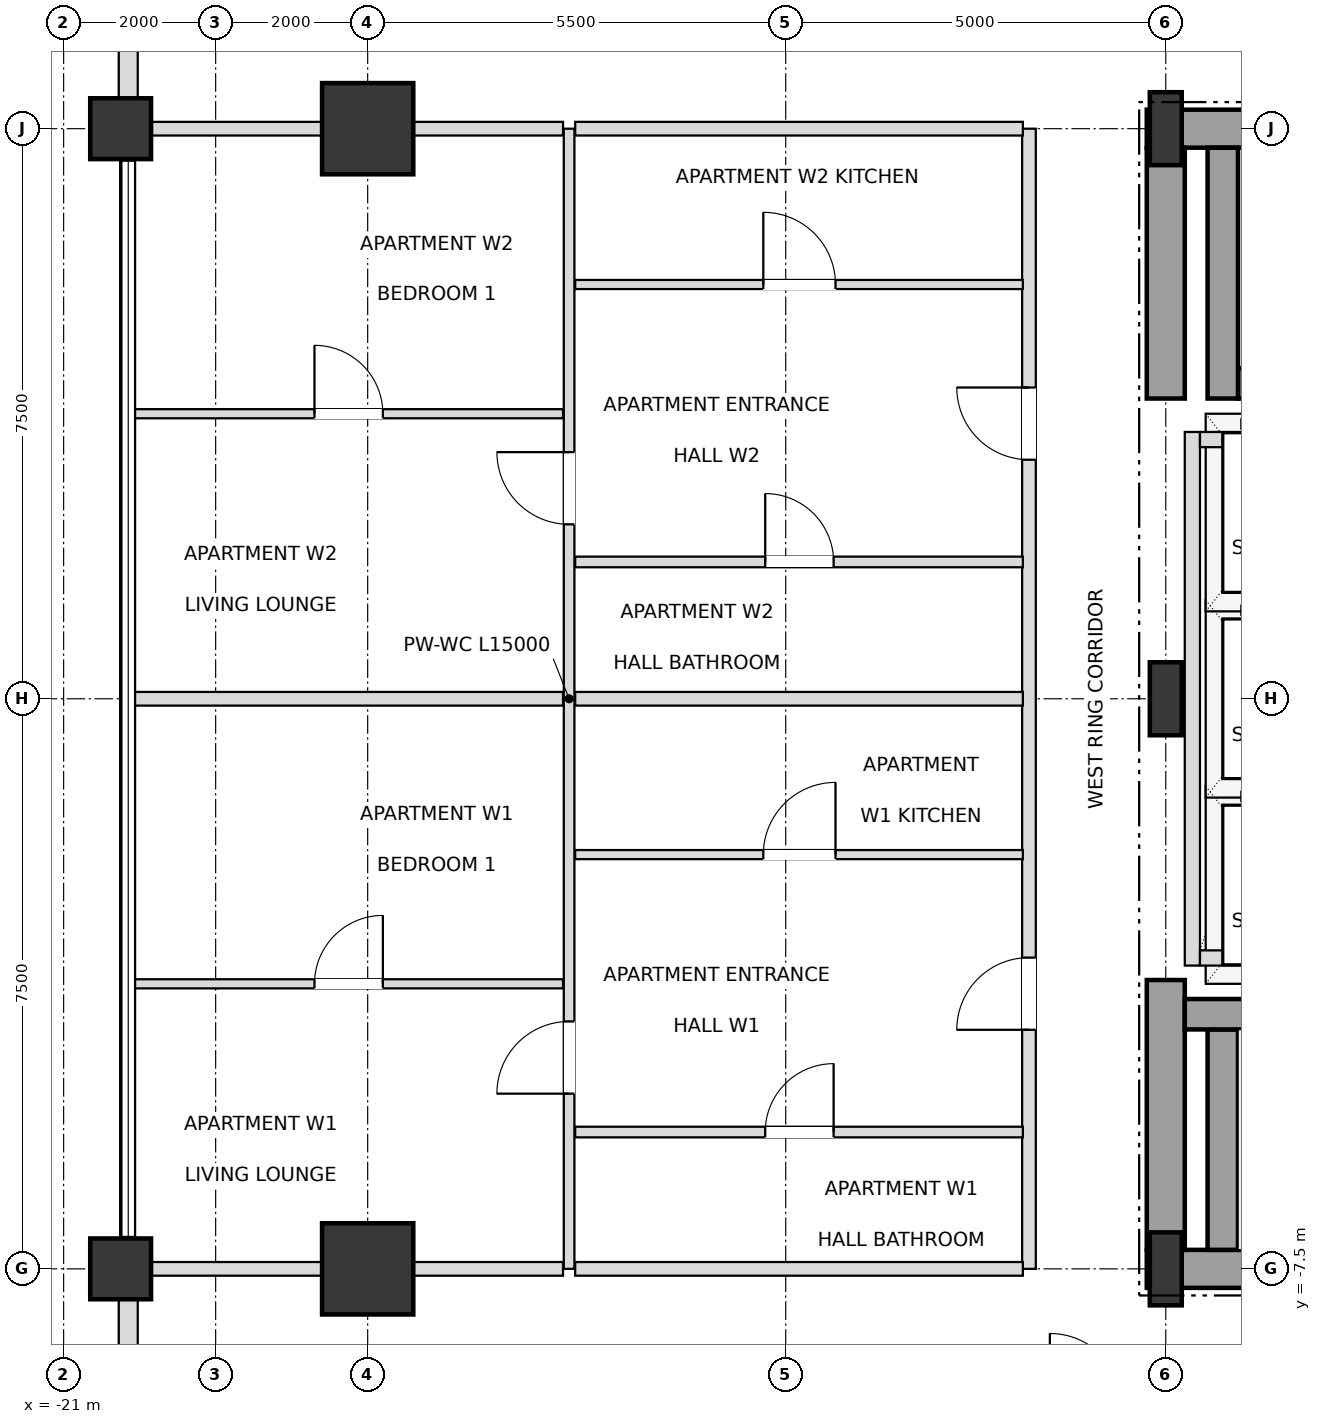
"""IFC4 building model, lengths in metres.
Left out: names, types, materials, properties, quantities, classifications, styles, units other than length and angle.
Written with IfcOpenShell. Run it as: python <this file> out.ifc"""

import sys

from ifc_helpers import new_model, si_unit, direction, frame, frame_2d, origin, origin_2d, place, context, subcontext, project, spatial, rectangle, i_section, extrude, element, fill, save


model = new_model("IFC4")
c1 = context("Model", 3, precision=1e-05, world=origin(), true_north=direction((0.0, 1.0)))
c2 = subcontext(c1, "Body", "Model", "MODEL_VIEW")
j1 = project(units=[si_unit("LENGTHUNIT", "METRE"), si_unit("PLANEANGLEUNIT", "RADIAN")], contexts=[c1])
p1 = place(None, origin())
s1 = spatial("IfcSite", under=j1, at=p1, CompositionType="ELEMENT")
p2 = place(p1, origin())
s2 = spatial("IfcBuilding", under=s1, at=p2, CompositionType="ELEMENT")
p3 = place(p2, frame((0.0, 0.0, 102.6)))
s3 = spatial("IfcBuildingStorey", under=s2, at=p3, CompositionType="ELEMENT", Elevation=102.6)
for number, where, z_axis, x_axis in (
    (1, (-6.5, -7.5, 0.0), (0.0, 0.0, 1.0), (1.0, 0.0, 0.0)),
    (2, (-6.5, 0.0, 0.0), (0.0, 0.0, 1.0), (1.0, 0.0, 0.0)),
    (3, (-6.5, 7.5, 0.0), (0.0, 0.0, 1.0), (1.0, 0.0, 0.0)),
):
    element("IfcColumn", number, at=place(p3, frame(where, z_axis=z_axis, x_axis=x_axis)), inside=s3, PredefinedType="COLUMN", context=c2, shape_type="SweptSolid", body=[
        extrude(i_section(OverallWidth=0.42, OverallDepth=0.96, WebThickness=0.022, FlangeThickness=0.034, at=origin_2d()), origin(), (0.0, 0.0, 1.0), 3.6),
    ])
for number, where, z_axis, x_axis in (
    (4, (-17.0, 7.5, 0.0), (0.0, 0.0, 1.0), (1.0, 0.0, 0.0)),
    (5, (-17.0, -7.5, 0.0), (0.0, 0.0, 1.0), (1.0, 0.0, 0.0)),
):
    element("IfcColumn", number, at=place(p3, frame(where, z_axis=z_axis, x_axis=x_axis)), inside=s3, PredefinedType="USERDEFINED", context=c2, shape_type="SweptSolid", body=[
        extrude(rectangle(XDim=1.2, YDim=1.2, at=origin_2d()), origin(), (0.0, 0.0, 1.0), 3.6),
    ])
for number, where, z_axis, x_axis in (
    (6, (-20.25, -7.5, 0.0), (0.0, 0.0, 1.0), (1.0, 0.0, 0.0)),
    (7, (-20.25, 7.5, 0.0), (0.0, 0.0, 1.0), (1.0, 0.0, 0.0)),
):
    element("IfcColumn", number, at=place(p3, frame(where, z_axis=z_axis, x_axis=x_axis)), inside=s3, PredefinedType="COLUMN", context=c2, shape_type="SweptSolid", body=[
        extrude(rectangle(XDim=0.8, YDim=0.8, at=origin_2d()), origin(), (0.0, 0.0, 1.0), 3.6),
    ])
p4 = place(p3, frame((-20.15, 12.605, 0.0), z_axis=(0.0, 0.0, 1.0), x_axis=(0.0, -1.0, 0.0)))
e8 = element("IfcWall", 8, at=p4, inside=s3, PredefinedType="SOLIDWALL", context=c2, shape_type="SweptSolid", body=[
    extrude(rectangle(XDim=4.71, YDim=0.25, at=frame_2d((2.355, 0.0))), origin(), (0.0, 0.0, 1.0), 2.736),
])
p5 = place(p4, frame((1.455, 0.0, 0.72)))
e9 = element("IfcOpeningElement", 9, at=p5, cuts=e8, PredefinedType="OPENING", context=c2, shape_type="SweptSolid", body=[
    extrude(rectangle(XDim=1.8, YDim=1.68, at=frame_2d((0.9, 0.84))), frame((0.0, 0.135, 0.0), z_axis=(0.0, -1.0, 0.0), x_axis=(1.0, 0.0, 0.0)), (0.0, 0.0, 1.0), 0.27),
])
p6 = place(p3, frame((-20.15, -7.895, 0.0), z_axis=(0.0, 0.0, 1.0), x_axis=(0.0, -1.0, 0.0)))
e10 = element("IfcWall", 10, at=p6, inside=s3, PredefinedType="SOLIDWALL", context=c2, shape_type="SweptSolid", body=[
    extrude(rectangle(XDim=4.71, YDim=0.25, at=frame_2d((2.355, 0.0))), origin(), (0.0, 0.0, 1.0), 2.736),
])
p7 = place(p6, frame((1.455, 0.0, 0.72)))
e11 = element("IfcOpeningElement", 11, at=p7, cuts=e10, PredefinedType="OPENING", context=c2, shape_type="SweptSolid", body=[
    extrude(rectangle(XDim=1.8, YDim=1.68, at=frame_2d((0.9, 0.84))), frame((0.0, 0.135, 0.0), z_axis=(0.0, -1.0, 0.0), x_axis=(1.0, 0.0, 0.0)), (0.0, 0.0, 1.0), 0.27),
])
p8 = place(p3, frame((-6.75, -7.5, 0.0), z_axis=(0.0, 0.0, 1.0), x_axis=(1.0, 0.0, 0.0)))
e12 = element("IfcWall", 12, at=p8, inside=s3, PredefinedType="SHEAR", context=c2, shape_type="SweptSolid", body=[
    extrude(rectangle(XDim=6.75, YDim=0.5, at=frame_2d((3.375, 0.0))), origin(), (0.0, 0.0, 1.0), 3.38),
])
p9 = place(p3, frame((-6.75, 7.5, 0.0), z_axis=(0.0, 0.0, 1.0), x_axis=(1.0, 0.0, 0.0)))
e13 = element("IfcWall", 13, at=p9, inside=s3, PredefinedType="SHEAR", context=c2, shape_type="SweptSolid", body=[
    extrude(rectangle(XDim=6.75, YDim=0.5, at=frame_2d((3.375, 0.0))), origin(), (0.0, 0.0, 1.0), 3.38),
])
p10 = place(p9, frame((1.65, 0.0, 0.0)))
e14 = element("IfcOpeningElement", 14, at=p10, cuts=e13, PredefinedType="OPENING", context=c2, shape_type="SweptSolid", body=[
    extrude(rectangle(XDim=1.05, YDim=2.15, at=frame_2d((0.525, 1.075))), frame((0.0, 0.26, 0.0), z_axis=(0.0, -1.0, 0.0), x_axis=(1.0, 0.0, 0.0)), (0.0, 0.0, 1.0), 0.52),
])
p11 = place(p3, frame((-6.5, -7.25, 0.0), z_axis=(0.0, 0.0, 1.0), x_axis=(0.0, 1.0, 0.0)))
e15 = element("IfcWall", 15, at=p11, inside=s3, PredefinedType="SHEAR", context=c2, shape_type="SweptSolid", body=[
    extrude(rectangle(XDim=3.55, YDim=0.5, at=frame_2d((1.775, 0.0))), origin(), (0.0, 0.0, 1.0), 3.38),
])
p12 = place(p3, frame((-6.5, 3.95, 0.0), z_axis=(0.0, 0.0, 1.0), x_axis=(0.0, 1.0, 0.0)))
e16 = element("IfcWall", 16, at=p12, inside=s3, PredefinedType="SHEAR", context=c2, shape_type="SweptSolid", body=[
    extrude(rectangle(XDim=3.3, YDim=0.5, at=frame_2d((1.65, 0.0))), origin(), (0.0, 0.0, 1.0), 3.38),
])
p13 = place(p3, frame((-5.75, -7.25, 0.0), z_axis=(0.0, 0.0, 1.0), x_axis=(0.0, 1.0, 0.0)))
e17 = element("IfcWall", 17, at=p13, inside=s3, PredefinedType="SHEAR", context=c2, shape_type="SweptSolid", body=[
    extrude(rectangle(XDim=2.9, YDim=0.4, at=frame_2d((1.45, 0.0))), origin(), (0.0, 0.0, 1.0), 3.38),
])
p14 = place(p3, frame((-6.25, -4.15, 0.0), z_axis=(0.0, 0.0, 1.0), x_axis=(1.0, 0.0, 0.0)))
e18 = element("IfcWall", 18, at=p14, inside=s3, PredefinedType="SHEAR", context=c2, shape_type="SweptSolid", body=[
    extrude(rectangle(XDim=7.78, YDim=0.4, at=frame_2d((3.89, 0.0))), origin(), (0.0, 0.0, 1.0), 3.38),
])
p15 = place(p3, frame((-5.55, 4.15, 0.0), z_axis=(0.0, 0.0, 1.0), x_axis=(1.0, 0.0, 0.0)))
e19 = element("IfcWall", 19, at=p15, inside=s3, PredefinedType="SHEAR", context=c2, shape_type="SweptSolid", body=[
    extrude(rectangle(XDim=7.08, YDim=0.4, at=frame_2d((3.54, 0.0))), origin(), (0.0, 0.0, 1.0), 3.38),
])
p16 = place(p3, frame((-5.75, 3.95, 0.0), z_axis=(0.0, 0.0, 1.0), x_axis=(0.0, 1.0, 0.0)))
e20 = element("IfcWall", 20, at=p16, inside=s3, PredefinedType="SHEAR", context=c2, shape_type="SweptSolid", body=[
    extrude(rectangle(XDim=3.3, YDim=0.4, at=frame_2d((1.65, 0.0))), origin(), (0.0, 0.0, 1.0), 3.38),
])
p17 = place(p3, frame((-6.15, -3.51, 0.0), z_axis=(0.0, 0.0, 1.0), x_axis=(0.0, 1.0, 0.0)))
e21 = element("IfcWall", 21, at=p17, inside=s3, PredefinedType="SOLIDWALL", context=c2, shape_type="SweptSolid", body=[
    extrude(rectangle(XDim=7.02, YDim=0.2, at=frame_2d((3.51, 0.0))), origin(), (0.0, 0.0, 1.0), 3.38),
])
for number, where, z_axis, x_axis in (
    (22, (-6.05, -3.41, 0.0), (0.0, 0.0, 1.0), (1.0, 0.0, 0.0)),
    (23, (-6.05, 3.41, 0.0), (0.0, 0.0, 1.0), (1.0, 0.0, 0.0)),
):
    element("IfcWall", number, at=place(p3, frame(where, z_axis=z_axis, x_axis=x_axis)), inside=s3, PredefinedType="SOLIDWALL", context=c2, shape_type="SweptSolid", body=[
        extrude(rectangle(XDim=2.2, YDim=0.2, at=frame_2d((1.1, 0.0))), origin(), (0.0, 0.0, 1.0), 3.38),
    ])
p18 = place(p3, frame((-14.35, -7.5, 0.0), z_axis=(0.0, 0.0, 1.0), x_axis=(0.0, 1.0, 0.0)))
e24 = element("IfcWall", 24, at=p18, inside=s3, PredefinedType="PARTITIONING", context=c2, shape_type="SweptSolid", body=[
    extrude(rectangle(XDim=15.0, YDim=0.14, at=frame_2d((7.5, 0.0))), origin(), (0.0, 0.0, 1.0), 3.38),
])
p19 = place(p18, frame((2.305, 0.0, 0.0)))
e25 = element("IfcOpeningElement", 25, at=p19, cuts=e24, PredefinedType="OPENING", context=c2, shape_type="SweptSolid", body=[
    extrude(rectangle(XDim=0.95, YDim=2.1, at=frame_2d((0.475, 1.05))), frame((0.0, 0.08, 0.0), z_axis=(0.0, -1.0, 0.0), x_axis=(1.0, 0.0, 0.0)), (0.0, 0.0, 1.0), 0.16),
])
p20 = place(p18, frame((9.795, 0.0, 0.0)))
e26 = element("IfcOpeningElement", 26, at=p20, cuts=e24, PredefinedType="OPENING", context=c2, shape_type="SweptSolid", body=[
    extrude(rectangle(XDim=0.95, YDim=2.1, at=frame_2d((0.475, 1.05))), frame((0.0, 0.08, 0.0), z_axis=(0.0, -1.0, 0.0), x_axis=(1.0, 0.0, 0.0)), (0.0, 0.0, 1.0), 0.16),
])
p21 = place(p3, frame((-8.3, -7.5, 0.0), z_axis=(0.0, 0.0, 1.0), x_axis=(0.0, 1.0, 0.0)))
e27 = element("IfcWall", 27, at=p21, inside=s3, PredefinedType="PARTITIONING", context=c2, shape_type="SweptSolid", body=[
    extrude(rectangle(XDim=15.0, YDim=0.18, at=frame_2d((7.5, 0.0))), origin(), (0.0, 0.0, 1.0), 3.38),
])
p22 = place(p21, frame((3.145, 0.0, 0.0)))
e28 = element("IfcOpeningElement", 28, at=p22, cuts=e27, PredefinedType="OPENING", context=c2, shape_type="SweptSolid", body=[
    extrude(rectangle(XDim=0.95, YDim=2.15, at=frame_2d((0.475, 1.075))), frame((0.0, 0.1, 0.0), z_axis=(0.0, -1.0, 0.0), x_axis=(1.0, 0.0, 0.0)), (0.0, 0.0, 1.0), 0.2),
])
p23 = place(p21, frame((10.645, 0.0, 0.0)))
e29 = element("IfcOpeningElement", 29, at=p23, cuts=e27, PredefinedType="OPENING", context=c2, shape_type="SweptSolid", body=[
    extrude(rectangle(XDim=0.95, YDim=2.15, at=frame_2d((0.475, 1.075))), frame((0.0, 0.1, 0.0), z_axis=(0.0, -1.0, 0.0), x_axis=(1.0, 0.0, 0.0)), (0.0, 0.0, 1.0), 0.2),
])
p24 = place(p3, frame((-20.15, -7.5, 0.0), z_axis=(0.0, 0.0, 1.0), x_axis=(1.0, 0.0, 0.0)))
e30 = element("IfcWall", 30, at=p24, inside=s3, PredefinedType="PARTITIONING", context=c2, shape_type="SweptSolid", body=[
    extrude(rectangle(XDim=5.72, YDim=0.18, at=frame_2d((2.86, 0.0))), origin(), (0.0, 0.0, 1.0), 2.816),
])
p25 = place(p3, frame((-14.27, -7.5, 0.0), z_axis=(0.0, 0.0, 1.0), x_axis=(1.0, 0.0, 0.0)))
e31 = element("IfcWall", 31, at=p25, inside=s3, PredefinedType="PARTITIONING", context=c2, shape_type="SweptSolid", body=[
    extrude(rectangle(XDim=5.89, YDim=0.18, at=frame_2d((2.945, 0.0))), origin(), (0.0, 0.0, 1.0), 2.816),
])
p26 = place(p3, frame((-14.27, -5.7, 0.0), z_axis=(0.0, 0.0, 1.0), x_axis=(1.0, 0.0, 0.0)))
e32 = element("IfcWall", 32, at=p26, inside=s3, PredefinedType="PARTITIONING", context=c2, shape_type="SweptSolid", body=[
    extrude(rectangle(XDim=5.89, YDim=0.14, at=frame_2d((2.945, 0.0))), origin(), (0.0, 0.0, 1.0), 3.38),
])
p27 = place(p26, frame((2.5, 0.0, 0.0)))
e33 = element("IfcOpeningElement", 33, at=p27, cuts=e32, PredefinedType="OPENING", context=c2, shape_type="SweptSolid", body=[
    extrude(rectangle(XDim=0.9, YDim=2.1, at=frame_2d((0.45, 1.05))), frame((0.0, 0.08, 0.0), z_axis=(0.0, -1.0, 0.0), x_axis=(1.0, 0.0, 0.0)), (0.0, 0.0, 1.0), 0.16),
])
p28 = place(p3, frame((-20.07, -3.75, 0.0), z_axis=(0.0, 0.0, 1.0), x_axis=(1.0, 0.0, 0.0)))
e34 = element("IfcWall", 34, at=p28, inside=s3, PredefinedType="PARTITIONING", context=c2, shape_type="SweptSolid", body=[
    extrude(rectangle(XDim=5.64, YDim=0.12, at=frame_2d((2.82, 0.0))), origin(), (0.0, 0.0, 1.0), 2.816),
])
p29 = place(p28, frame((2.37, 0.0, 0.0)))
e35 = element("IfcOpeningElement", 35, at=p29, cuts=e34, PredefinedType="OPENING", context=c2, shape_type="SweptSolid", body=[
    extrude(rectangle(XDim=0.9, YDim=2.1, at=frame_2d((0.45, 1.05))), frame((0.0, 0.07, 0.0), z_axis=(0.0, -1.0, 0.0), x_axis=(1.0, 0.0, 0.0)), (0.0, 0.0, 1.0), 0.14),
])
p30 = place(p3, frame((-14.27, -2.05, 0.0), z_axis=(0.0, 0.0, 1.0), x_axis=(1.0, 0.0, 0.0)))
e36 = element("IfcWall", 36, at=p30, inside=s3, PredefinedType="PARTITIONING", context=c2, shape_type="SweptSolid", body=[
    extrude(rectangle(XDim=5.89, YDim=0.12, at=frame_2d((2.945, 0.0))), origin(), (0.0, 0.0, 1.0), 3.38),
])
p31 = place(p30, frame((2.475, 0.0, 0.0)))
e37 = element("IfcOpeningElement", 37, at=p31, cuts=e36, PredefinedType="OPENING", context=c2, shape_type="SweptSolid", body=[
    extrude(rectangle(XDim=0.95, YDim=2.1, at=frame_2d((0.475, 1.05))), frame((0.0, 0.07, 0.0), z_axis=(0.0, -1.0, 0.0), x_axis=(1.0, 0.0, 0.0)), (0.0, 0.0, 1.0), 0.14),
])
p32 = place(p3, frame((-20.07, 0.0, 0.0), z_axis=(0.0, 0.0, 1.0), x_axis=(1.0, 0.0, 0.0)))
e38 = element("IfcWall", 38, at=p32, inside=s3, PredefinedType="PARTITIONING", context=c2, shape_type="SweptSolid", body=[
    extrude(rectangle(XDim=5.64, YDim=0.18, at=frame_2d((2.82, 0.0))), origin(), (0.0, 0.0, 1.0), 2.816),
])
p33 = place(p3, frame((-14.27, 0.0, 0.0), z_axis=(0.0, 0.0, 1.0), x_axis=(1.0, 0.0, 0.0)))
e39 = element("IfcWall", 39, at=p33, inside=s3, PredefinedType="PARTITIONING", context=c2, shape_type="SweptSolid", body=[
    extrude(rectangle(XDim=5.89, YDim=0.18, at=frame_2d((2.945, 0.0))), origin(), (0.0, 0.0, 1.0), 3.38),
])
p34 = place(p3, frame((-14.27, 1.8, 0.0), z_axis=(0.0, 0.0, 1.0), x_axis=(1.0, 0.0, 0.0)))
e40 = element("IfcWall", 40, at=p34, inside=s3, PredefinedType="PARTITIONING", context=c2, shape_type="SweptSolid", body=[
    extrude(rectangle(XDim=5.89, YDim=0.14, at=frame_2d((2.945, 0.0))), origin(), (0.0, 0.0, 1.0), 3.38),
])
p35 = place(p34, frame((2.5, 0.0, 0.0)))
e41 = element("IfcOpeningElement", 41, at=p35, cuts=e40, PredefinedType="OPENING", context=c2, shape_type="SweptSolid", body=[
    extrude(rectangle(XDim=0.9, YDim=2.1, at=frame_2d((0.45, 1.05))), frame((0.0, 0.08, 0.0), z_axis=(0.0, -1.0, 0.0), x_axis=(1.0, 0.0, 0.0)), (0.0, 0.0, 1.0), 0.16),
])
p36 = place(p3, frame((-20.07, 3.75, 0.0), z_axis=(0.0, 0.0, 1.0), x_axis=(1.0, 0.0, 0.0)))
e42 = element("IfcWall", 42, at=p36, inside=s3, PredefinedType="PARTITIONING", context=c2, shape_type="SweptSolid", body=[
    extrude(rectangle(XDim=5.64, YDim=0.12, at=frame_2d((2.82, 0.0))), origin(), (0.0, 0.0, 1.0), 2.816),
])
p37 = place(p36, frame((2.37, 0.0, 0.0)))
e43 = element("IfcOpeningElement", 43, at=p37, cuts=e42, PredefinedType="OPENING", context=c2, shape_type="SweptSolid", body=[
    extrude(rectangle(XDim=0.9, YDim=2.1, at=frame_2d((0.45, 1.05))), frame((0.0, 0.07, 0.0), z_axis=(0.0, -1.0, 0.0), x_axis=(1.0, 0.0, 0.0)), (0.0, 0.0, 1.0), 0.14),
])
p38 = place(p3, frame((-14.27, 5.45, 0.0), z_axis=(0.0, 0.0, 1.0), x_axis=(1.0, 0.0, 0.0)))
e44 = element("IfcWall", 44, at=p38, inside=s3, PredefinedType="PARTITIONING", context=c2, shape_type="SweptSolid", body=[
    extrude(rectangle(XDim=5.89, YDim=0.12, at=frame_2d((2.945, 0.0))), origin(), (0.0, 0.0, 1.0), 3.38),
])
p39 = place(p38, frame((2.475, 0.0, 0.0)))
e45 = element("IfcOpeningElement", 45, at=p39, cuts=e44, PredefinedType="OPENING", context=c2, shape_type="SweptSolid", body=[
    extrude(rectangle(XDim=0.95, YDim=2.1, at=frame_2d((0.475, 1.05))), frame((0.0, 0.07, 0.0), z_axis=(0.0, -1.0, 0.0), x_axis=(1.0, 0.0, 0.0)), (0.0, 0.0, 1.0), 0.14),
])
p40 = place(p3, frame((-20.15, 7.5, 0.0), z_axis=(0.0, 0.0, 1.0), x_axis=(1.0, 0.0, 0.0)))
e46 = element("IfcWall", 46, at=p40, inside=s3, PredefinedType="PARTITIONING", context=c2, shape_type="SweptSolid", body=[
    extrude(rectangle(XDim=5.72, YDim=0.18, at=frame_2d((2.86, 0.0))), origin(), (0.0, 0.0, 1.0), 2.816),
])
p41 = place(p3, frame((-14.27, 7.5, 0.0), z_axis=(0.0, 0.0, 1.0), x_axis=(1.0, 0.0, 0.0)))
e47 = element("IfcWall", 47, at=p41, inside=s3, PredefinedType="PARTITIONING", context=c2, shape_type="SweptSolid", body=[
    extrude(rectangle(XDim=5.89, YDim=0.18, at=frame_2d((2.945, 0.0))), origin(), (0.0, 0.0, 1.0), 2.816),
])
p42 = place(p27, origin())
e48 = element("IfcDoor", 48, at=p42, inside=s3, OperationType="SINGLE_SWING_RIGHT", PredefinedType="DOOR", context=c2, shape_type="SweptSolid", body=[
    extrude(rectangle(XDim=0.9, YDim=2.1, at=frame_2d((0.45, 1.05))), frame((0.0, 0.025, 0.0), z_axis=(0.0, -1.0, 0.0), x_axis=(1.0, 0.0, 0.0)), (0.0, 0.0, 1.0), 0.05),
])
fill(e33, e48)
p43 = place(p22, origin())
e49 = element("IfcDoor", 49, at=p43, inside=s3, OperationType="SINGLE_SWING_LEFT", PredefinedType="DOOR", context=c2, shape_type="SweptSolid", body=[
    extrude(rectangle(XDim=0.95, YDim=2.15, at=frame_2d((0.475, 1.075))), frame((0.0, 0.025, 0.0), z_axis=(0.0, -1.0, 0.0), x_axis=(1.0, 0.0, 0.0)), (0.0, 0.0, 1.0), 0.05),
])
fill(e28, e49)
p44 = place(p31, origin())
e50 = element("IfcDoor", 50, at=p44, inside=s3, OperationType="SINGLE_SWING_RIGHT", PredefinedType="DOOR", context=c2, shape_type="SweptSolid", body=[
    extrude(rectangle(XDim=0.95, YDim=2.1, at=frame_2d((0.475, 1.05))), frame((0.0, 0.025, 0.0), z_axis=(0.0, -1.0, 0.0), x_axis=(1.0, 0.0, 0.0)), (0.0, 0.0, 1.0), 0.05),
])
fill(e37, e50)
p45 = place(p19, origin())
e51 = element("IfcDoor", 51, at=p45, inside=s3, OperationType="SINGLE_SWING_LEFT", PredefinedType="DOOR", context=c2, shape_type="SweptSolid", body=[
    extrude(rectangle(XDim=0.95, YDim=2.1, at=frame_2d((0.475, 1.05))), frame((0.0, 0.025, 0.0), z_axis=(0.0, -1.0, 0.0), x_axis=(1.0, 0.0, 0.0)), (0.0, 0.0, 1.0), 0.05),
])
fill(e25, e51)
p46 = place(p29, origin())
e52 = element("IfcDoor", 52, at=p46, inside=s3, OperationType="SINGLE_SWING_RIGHT", PredefinedType="DOOR", context=c2, shape_type="SweptSolid", body=[
    extrude(rectangle(XDim=0.9, YDim=2.1, at=frame_2d((0.45, 1.05))), frame((0.0, 0.025, 0.0), z_axis=(0.0, -1.0, 0.0), x_axis=(1.0, 0.0, 0.0)), (0.0, 0.0, 1.0), 0.05),
])
fill(e35, e52)
p47 = place(p35, origin())
e53 = element("IfcDoor", 53, at=p47, inside=s3, OperationType="SINGLE_SWING_LEFT", PredefinedType="DOOR", context=c2, shape_type="SweptSolid", body=[
    extrude(rectangle(XDim=0.9, YDim=2.1, at=frame_2d((0.45, 1.05))), frame((0.0, 0.025, 0.0), z_axis=(0.0, -1.0, 0.0), x_axis=(1.0, 0.0, 0.0)), (0.0, 0.0, 1.0), 0.05),
])
fill(e41, e53)
p48 = place(p23, origin())
e54 = element("IfcDoor", 54, at=p48, inside=s3, OperationType="SINGLE_SWING_RIGHT", PredefinedType="DOOR", context=c2, shape_type="SweptSolid", body=[
    extrude(rectangle(XDim=0.95, YDim=2.15, at=frame_2d((0.475, 1.075))), frame((0.0, 0.025, 0.0), z_axis=(0.0, -1.0, 0.0), x_axis=(1.0, 0.0, 0.0)), (0.0, 0.0, 1.0), 0.05),
])
fill(e29, e54)
p49 = place(p39, origin())
e55 = element("IfcDoor", 55, at=p49, inside=s3, OperationType="SINGLE_SWING_LEFT", PredefinedType="DOOR", context=c2, shape_type="SweptSolid", body=[
    extrude(rectangle(XDim=0.95, YDim=2.1, at=frame_2d((0.475, 1.05))), frame((0.0, 0.025, 0.0), z_axis=(0.0, -1.0, 0.0), x_axis=(1.0, 0.0, 0.0)), (0.0, 0.0, 1.0), 0.05),
])
fill(e45, e55)
p50 = place(p20, origin())
e56 = element("IfcDoor", 56, at=p50, inside=s3, OperationType="SINGLE_SWING_RIGHT", PredefinedType="DOOR", context=c2, shape_type="SweptSolid", body=[
    extrude(rectangle(XDim=0.95, YDim=2.1, at=frame_2d((0.475, 1.05))), frame((0.0, 0.025, 0.0), z_axis=(0.0, -1.0, 0.0), x_axis=(1.0, 0.0, 0.0)), (0.0, 0.0, 1.0), 0.05),
])
fill(e26, e56)
p51 = place(p37, origin())
e57 = element("IfcDoor", 57, at=p51, inside=s3, OperationType="SINGLE_SWING_LEFT", PredefinedType="DOOR", context=c2, shape_type="SweptSolid", body=[
    extrude(rectangle(XDim=0.9, YDim=2.1, at=frame_2d((0.45, 1.05))), frame((0.0, 0.025, 0.0), z_axis=(0.0, -1.0, 0.0), x_axis=(1.0, 0.0, 0.0)), (0.0, 0.0, 1.0), 0.05),
])
fill(e43, e57)
save(model, sys.argv[1])
